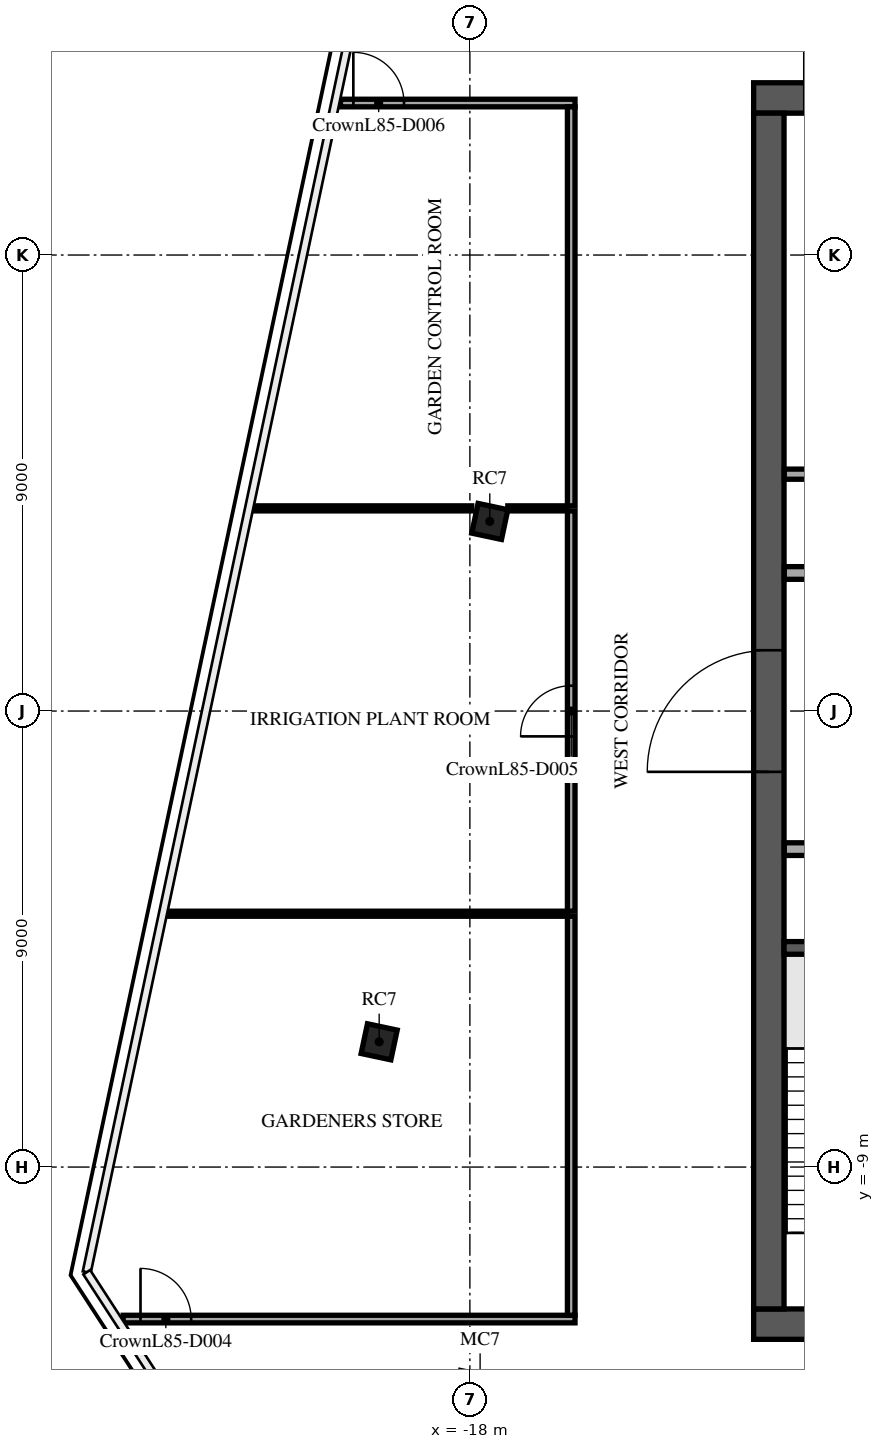
"""IFC4 building model, lengths in metres.
Left out: names, types, materials, properties, quantities, classifications, styles, units other than length and angle.
Written with IfcOpenShell. Run it as: python <this file> out.ifc"""

import sys

from ifc_helpers import new_model, si_unit, direction, frame, frame_2d, origin, origin_2d, place, context, subcontext, project, spatial, rectangle, extrude, element, fill, save


model = new_model("IFC4")
c1 = context("Model", 3, precision=1e-05, world=origin(), true_north=direction((0.0, 1.0)))
c2 = subcontext(c1, "Body", "Model", "MODEL_VIEW")
j1 = project(units=[si_unit("LENGTHUNIT", "METRE"), si_unit("PLANEANGLEUNIT", "RADIAN")], contexts=[c1])
p1 = place(None, origin())
s1 = spatial("IfcSite", under=j1, at=p1, CompositionType="ELEMENT")
p2 = place(p1, origin())
s2 = spatial("IfcBuilding", under=s1, at=p2, CompositionType="ELEMENT")
p3 = place(p2, frame((0.0, 0.0, 363.1)))
s3 = spatial("IfcBuildingStorey", under=s2, at=p3, CompositionType="ELEMENT", Elevation=363.1)
for number, where, z_axis, x_axis in (
    (1, (-17.607, 3.742, 0.0), (0.0, 0.0, 1.0), (0.208, 0.978, 0.0)),
    (2, (-19.79, -6.528, 0.0), (0.0, 0.0, 1.0), (0.208, 0.978, 0.0)),
):
    element("IfcColumn", number, at=place(p3, frame(where, z_axis=z_axis, x_axis=x_axis)), inside=s3, PredefinedType="COLUMN", context=c2, shape_type="SweptSolid", body=[
        extrude(rectangle(XDim=0.6, YDim=0.6, at=origin_2d()), origin(), (0.0, 0.0, 1.0), 5.0),
    ])
p4 = place(p3, frame((-12.4, 12.1, 0.0), z_axis=(0.0, 0.0, 1.0), x_axis=(1.0, 0.0, 0.0)))
e3 = element("IfcWall", 3, at=p4, inside=s3, PredefinedType="SHEAR", context=c2, shape_type="SweptSolid", body=[
    extrude(rectangle(XDim=24.8, YDim=0.6, at=frame_2d((12.4, 0.0))), origin(), (0.0, 0.0, 1.0), 4.7),
])
p5 = place(p4, frame((11.2, 0.0, 0.0)))
e4 = element("IfcOpeningElement", 4, at=p5, cuts=e3, PredefinedType="OPENING", context=c2, shape_type="SweptSolid", body=[
    extrude(rectangle(XDim=2.4, YDim=2.4, at=frame_2d((1.2, 1.2))), frame((0.0, 0.31, 0.0), z_axis=(0.0, -1.0, 0.0), x_axis=(1.0, 0.0, 0.0)), (0.0, 0.0, 1.0), 0.62),
])
p6 = place(p4, frame((22.025, 0.0, 0.0)))
e5 = element("IfcOpeningElement", 5, at=p6, cuts=e3, PredefinedType="OPENING", context=c2, shape_type="SweptSolid", body=[
    extrude(rectangle(XDim=1.2, YDim=2.1, at=frame_2d((0.6, 1.05))), frame((0.0, 0.31, 0.0), z_axis=(0.0, -1.0, 0.0), x_axis=(1.0, 0.0, 0.0)), (0.0, 0.0, 1.0), 0.62),
])
p7 = place(p4, frame((1.0, 0.0, 0.0)))
e6 = element("IfcOpeningElement", 6, at=p7, cuts=e3, PredefinedType="OPENING", context=c2, shape_type="SweptSolid", body=[
    extrude(rectangle(XDim=1.0, YDim=2.1, at=frame_2d((0.5, 1.05))), frame((0.0, 0.31, 0.0), z_axis=(0.0, -1.0, 0.0), x_axis=(1.0, 0.0, 0.0)), (0.0, 0.0, 1.0), 0.62),
])
p8 = place(p3, frame((-12.4, -12.1, 0.0), z_axis=(0.0, 0.0, 1.0), x_axis=(1.0, 0.0, 0.0)))
e7 = element("IfcWall", 7, at=p8, inside=s3, PredefinedType="SHEAR", context=c2, shape_type="SweptSolid", body=[
    extrude(rectangle(XDim=24.8, YDim=0.6, at=frame_2d((12.4, 0.0))), origin(), (0.0, 0.0, 1.0), 4.7),
])
p9 = place(p8, frame((7.3, 0.0, 0.0)))
e8 = element("IfcOpeningElement", 8, at=p9, cuts=e7, PredefinedType="OPENING", context=c2, shape_type="SweptSolid", body=[
    extrude(rectangle(XDim=2.0, YDim=2.1, at=frame_2d((1.0, 1.05))), frame((0.0, 0.31, 0.0), z_axis=(0.0, -1.0, 0.0), x_axis=(1.0, 0.0, 0.0)), (0.0, 0.0, 1.0), 0.62),
])
p10 = place(p8, frame((17.425, 0.0, 0.0)))
e9 = element("IfcOpeningElement", 9, at=p10, cuts=e7, PredefinedType="OPENING", context=c2, shape_type="SweptSolid", body=[
    extrude(rectangle(XDim=1.2, YDim=2.1, at=frame_2d((0.6, 1.05))), frame((0.0, 0.31, 0.0), z_axis=(0.0, -1.0, 0.0), x_axis=(1.0, 0.0, 0.0)), (0.0, 0.0, 1.0), 0.62),
])
p11 = place(p8, frame((1.575, 0.0, 0.0)))
e10 = element("IfcOpeningElement", 10, at=p11, cuts=e7, PredefinedType="OPENING", context=c2, shape_type="SweptSolid", body=[
    extrude(rectangle(XDim=1.2, YDim=2.1, at=frame_2d((0.6, 1.05))), frame((0.0, 0.31, 0.0), z_axis=(0.0, -1.0, 0.0), x_axis=(1.0, 0.0, 0.0)), (0.0, 0.0, 1.0), 0.62),
])
p12 = place(p8, frame((22.025, 0.0, 0.0)))
e11 = element("IfcOpeningElement", 11, at=p12, cuts=e7, PredefinedType="OPENING", context=c2, shape_type="SweptSolid", body=[
    extrude(rectangle(XDim=1.2, YDim=2.1, at=frame_2d((0.6, 1.05))), frame((0.0, 0.31, 0.0), z_axis=(0.0, -1.0, 0.0), x_axis=(1.0, 0.0, 0.0)), (0.0, 0.0, 1.0), 0.62),
])
p13 = place(p3, frame((-12.1, -11.8, 0.0), z_axis=(0.0, 0.0, 1.0), x_axis=(0.0, 1.0, 0.0)))
e12 = element("IfcWall", 12, at=p13, inside=s3, PredefinedType="SHEAR", context=c2, shape_type="SweptSolid", body=[
    extrude(rectangle(XDim=23.6, YDim=0.6, at=frame_2d((11.8, 0.0))), origin(), (0.0, 0.0, 1.0), 4.7),
])
p14 = place(p13, frame((10.6, 0.0, 0.0)))
e13 = element("IfcOpeningElement", 13, at=p14, cuts=e12, PredefinedType="OPENING", context=c2, shape_type="SweptSolid", body=[
    extrude(rectangle(XDim=2.4, YDim=2.4, at=frame_2d((1.2, 1.2))), frame((0.0, 0.31, 0.0), z_axis=(0.0, -1.0, 0.0), x_axis=(1.0, 0.0, 0.0)), (0.0, 0.0, 1.0), 0.62),
])
p15 = place(p3, frame((-8.65, -4.675, 0.0), z_axis=(0.0, 0.0, 1.0), x_axis=(-1.0, 0.0, 0.0)))
e14 = element("IfcWall", 14, at=p15, inside=s3, PredefinedType="SOLIDWALL", context=c2, shape_type="SweptSolid", body=[
    extrude(rectangle(XDim=3.15, YDim=0.25, at=frame_2d((1.575, 0.0))), origin(), (0.0, 0.0, 1.0), 4.7),
])
p16 = place(p3, frame((-11.795, -2.725, 0.0), z_axis=(0.0, 0.0, 1.0), x_axis=(1.0, 0.0, 0.0)))
e15 = element("IfcWall", 15, at=p16, inside=s3, PredefinedType="PARTITIONING", context=c2, shape_type="SweptSolid", body=[
    extrude(rectangle(XDim=14.415, YDim=0.25, at=frame_2d((7.208, 0.0))), origin(), (0.0, 0.0, 1.0), 4.7),
])
p17 = place(p16, frame((1.295, 0.0, 0.0)))
e16 = element("IfcOpeningElement", 16, at=p17, cuts=e15, PredefinedType="OPENING", context=c2, shape_type="SweptSolid", body=[
    extrude(rectangle(XDim=1.0, YDim=2.1, at=frame_2d((0.5, 1.05))), frame((0.0, 0.135, 0.0), z_axis=(0.0, -1.0, 0.0), x_axis=(1.0, 0.0, 0.0)), (0.0, 0.0, 1.0), 0.27),
])
p18 = place(p16, frame((4.42, 0.0, 0.0)))
e17 = element("IfcOpeningElement", 17, at=p18, cuts=e15, PredefinedType="OPENING", context=c2, shape_type="SweptSolid", body=[
    extrude(rectangle(XDim=1.0, YDim=2.1, at=frame_2d((0.5, 1.05))), frame((0.0, 0.135, 0.0), z_axis=(0.0, -1.0, 0.0), x_axis=(1.0, 0.0, 0.0)), (0.0, 0.0, 1.0), 0.27),
])
p19 = place(p16, frame((9.92, 0.0, 0.0)))
e18 = element("IfcOpeningElement", 18, at=p19, cuts=e15, PredefinedType="OPENING", context=c2, shape_type="SweptSolid", body=[
    extrude(rectangle(XDim=1.0, YDim=2.1, at=frame_2d((0.5, 1.05))), frame((0.0, 0.135, 0.0), z_axis=(0.0, -1.0, 0.0), x_axis=(1.0, 0.0, 0.0)), (0.0, 0.0, 1.0), 0.27),
])
p20 = place(p3, frame((-11.795, 2.725, 0.0), z_axis=(0.0, 0.0, 1.0), x_axis=(1.0, 0.0, 0.0)))
e19 = element("IfcWall", 19, at=p20, inside=s3, PredefinedType="PARTITIONING", context=c2, shape_type="SweptSolid", body=[
    extrude(rectangle(XDim=23.59, YDim=0.25, at=frame_2d((11.795, 0.0))), origin(), (0.0, 0.0, 1.0), 4.7),
])
p21 = place(p20, frame((21.345, 0.0, 0.0)))
e20 = element("IfcOpeningElement", 20, at=p21, cuts=e19, PredefinedType="OPENING", context=c2, shape_type="SweptSolid", body=[
    extrude(rectangle(XDim=0.9, YDim=2.1, at=frame_2d((0.45, 1.05))), frame((0.0, 0.135, 0.0), z_axis=(0.0, -1.0, 0.0), x_axis=(1.0, 0.0, 0.0)), (0.0, 0.0, 1.0), 0.27),
])
p22 = place(p20, frame((1.345, 0.0, 0.0)))
e21 = element("IfcOpeningElement", 21, at=p22, cuts=e19, PredefinedType="OPENING", context=c2, shape_type="SweptSolid", body=[
    extrude(rectangle(XDim=0.9, YDim=2.1, at=frame_2d((0.45, 1.05))), frame((0.0, 0.135, 0.0), z_axis=(0.0, -1.0, 0.0), x_axis=(1.0, 0.0, 0.0)), (0.0, 0.0, 1.0), 0.27),
])
p23 = place(p20, frame((4.42, 0.0, 0.0)))
e22 = element("IfcOpeningElement", 22, at=p23, cuts=e19, PredefinedType="OPENING", context=c2, shape_type="SweptSolid", body=[
    extrude(rectangle(XDim=1.0, YDim=2.1, at=frame_2d((0.5, 1.05))), frame((0.0, 0.135, 0.0), z_axis=(0.0, -1.0, 0.0), x_axis=(1.0, 0.0, 0.0)), (0.0, 0.0, 1.0), 0.27),
])
p24 = place(p20, frame((9.82, 0.0, 0.0)))
e23 = element("IfcOpeningElement", 23, at=p24, cuts=e19, PredefinedType="OPENING", context=c2, shape_type="SweptSolid", body=[
    extrude(rectangle(XDim=1.2, YDim=2.1, at=frame_2d((0.6, 1.05))), frame((0.0, 0.135, 0.0), z_axis=(0.0, -1.0, 0.0), x_axis=(1.0, 0.0, 0.0)), (0.0, 0.0, 1.0), 0.27),
])
p25 = place(p3, frame((-11.795, 4.675, 0.0), z_axis=(0.0, 0.0, 1.0), x_axis=(1.0, 0.0, 0.0)))
e24 = element("IfcWall", 24, at=p25, inside=s3, PredefinedType="PARTITIONING", context=c2, shape_type="SweptSolid", body=[
    extrude(rectangle(XDim=3.645, YDim=0.2, at=frame_2d((1.823, 0.0))), origin(), (0.0, 0.0, 1.0), 4.7),
])
p26 = place(p3, frame((-24.842, -12.0, 0.0), z_axis=(0.0, 0.0, 1.0), x_axis=(1.0, 0.0, 0.0)))
e25 = element("IfcWall", 25, at=p26, inside=s3, PredefinedType="PARTITIONING", context=c2, shape_type="SweptSolid", body=[
    extrude(rectangle(XDim=8.917, YDim=0.15, at=frame_2d((4.458, 0.0))), origin(), (0.0, 0.0, 1.0), 4.7),
])
p27 = place(p26, frame((0.342, 0.0, 0.0)))
e26 = element("IfcOpeningElement", 26, at=p27, cuts=e25, PredefinedType="OPENING", context=c2, shape_type="SweptSolid", body=[
    extrude(rectangle(XDim=1.0, YDim=2.1, at=frame_2d((0.5, 1.05))), frame((0.0, 0.085, 0.0), z_axis=(0.0, -1.0, 0.0), x_axis=(1.0, 0.0, 0.0)), (0.0, 0.0, 1.0), 0.17),
])
p28 = place(p3, frame((-23.955, -4.0, 0.0), z_axis=(0.0, 0.0, 1.0), x_axis=(1.0, 0.0, 0.0)))
e27 = element("IfcWall", 27, at=p28, inside=s3, PredefinedType="PARTITIONING", context=c2, shape_type="SweptSolid", body=[
    extrude(rectangle(XDim=7.88, YDim=0.1, at=frame_2d((3.94, 0.0))), origin(), (0.0, 0.0, 1.0), 4.7),
])
p29 = place(p3, frame((-22.255, 4.0, 0.0), z_axis=(0.0, 0.0, 1.0), x_axis=(1.0, 0.0, 0.0)))
e28 = element("IfcWall", 28, at=p29, inside=s3, PredefinedType="PARTITIONING", context=c2, shape_type="SweptSolid", body=[
    extrude(rectangle(XDim=4.292, YDim=0.1, at=frame_2d((2.146, 0.0))), origin(), (0.0, 0.0, 1.0), 4.29),
])
p30 = place(p3, frame((-17.251, 4.0, 0.0), z_axis=(0.0, 0.0, 1.0), x_axis=(1.0, 0.0, 0.0)))
e29 = element("IfcWall", 29, at=p30, inside=s3, PredefinedType="PARTITIONING", context=c2, shape_type="SweptSolid", body=[
    extrude(rectangle(XDim=1.176, YDim=0.1, at=frame_2d((0.588, 0.0))), origin(), (0.0, 0.0, 1.0), 4.7),
])
p31 = place(p3, frame((-20.554, 12.0, 0.0), z_axis=(0.0, 0.0, 1.0), x_axis=(1.0, 0.0, 0.0)))
e30 = element("IfcWall", 30, at=p31, inside=s3, PredefinedType="PARTITIONING", context=c2, shape_type="SweptSolid", body=[
    extrude(rectangle(XDim=4.629, YDim=0.15, at=frame_2d((2.314, 0.0))), origin(), (0.0, 0.0, 1.0), 4.7),
])
p32 = place(p31, frame((0.254, 0.0, 0.0)))
e31 = element("IfcOpeningElement", 31, at=p32, cuts=e30, PredefinedType="OPENING", context=c2, shape_type="SweptSolid", body=[
    extrude(rectangle(XDim=1.0, YDim=2.1, at=frame_2d((0.5, 1.05))), frame((0.0, 0.085, 0.0), z_axis=(0.0, -1.0, 0.0), x_axis=(1.0, 0.0, 0.0)), (0.0, 0.0, 1.0), 0.17),
])
p33 = place(p3, frame((-16.0, -11.925, 0.0), z_axis=(0.0, 0.0, 1.0), x_axis=(0.0, 1.0, 0.0)))
e32 = element("IfcWall", 32, at=p33, inside=s3, PredefinedType="PARTITIONING", context=c2, shape_type="SweptSolid", body=[
    extrude(rectangle(XDim=7.875, YDim=0.15, at=frame_2d((3.938, 0.0))), origin(), (0.0, 0.0, 1.0), 4.7),
])
p34 = place(p3, frame((-16.0, -3.95, 0.0), z_axis=(0.0, 0.0, 1.0), x_axis=(0.0, 1.0, 0.0)))
e33 = element("IfcWall", 33, at=p34, inside=s3, PredefinedType="PARTITIONING", context=c2, shape_type="SweptSolid", body=[
    extrude(rectangle(XDim=7.9, YDim=0.15, at=frame_2d((3.95, 0.0))), origin(), (0.0, 0.0, 1.0), 4.7),
])
p35 = place(p34, frame((3.45, 0.0, 0.0)))
e34 = element("IfcOpeningElement", 34, at=p35, cuts=e33, PredefinedType="OPENING", context=c2, shape_type="SweptSolid", body=[
    extrude(rectangle(XDim=1.0, YDim=2.1, at=frame_2d((0.5, 1.05))), frame((0.0, 0.085, 0.0), z_axis=(0.0, -1.0, 0.0), x_axis=(1.0, 0.0, 0.0)), (0.0, 0.0, 1.0), 0.17),
])
p36 = place(p3, frame((-16.0, 4.05, 0.0), z_axis=(0.0, 0.0, 1.0), x_axis=(0.0, 1.0, 0.0)))
e35 = element("IfcWall", 35, at=p36, inside=s3, PredefinedType="PARTITIONING", context=c2, shape_type="SweptSolid", body=[
    extrude(rectangle(XDim=7.875, YDim=0.15, at=frame_2d((3.938, 0.0))), origin(), (0.0, 0.0, 1.0), 4.23),
])
p37 = place(p14, origin())
e36 = element("IfcDoor", 36, at=p37, inside=s3, OperationType="SINGLE_SWING_LEFT", PredefinedType="DOOR", context=c2, shape_type="SweptSolid", body=[
    extrude(rectangle(XDim=2.4, YDim=2.4, at=frame_2d((1.2, 1.2))), frame((0.0, 0.025, 0.0), z_axis=(0.0, -1.0, 0.0), x_axis=(1.0, 0.0, 0.0)), (0.0, 0.0, 1.0), 0.05),
])
fill(e13, e36)
p38 = place(p27, origin())
e37 = element("IfcDoor", 37, at=p38, inside=s3, OperationType="SINGLE_SWING_RIGHT", PredefinedType="DOOR", context=c2, shape_type="SweptSolid", body=[
    extrude(rectangle(XDim=1.0, YDim=2.1, at=frame_2d((0.5, 1.05))), frame((0.0, 0.025, 0.0), z_axis=(0.0, -1.0, 0.0), x_axis=(1.0, 0.0, 0.0)), (0.0, 0.0, 1.0), 0.05),
])
fill(e26, e37)
p39 = place(p35, origin())
e38 = element("IfcDoor", 38, at=p39, inside=s3, OperationType="SINGLE_SWING_LEFT", PredefinedType="DOOR", context=c2, shape_type="SweptSolid", body=[
    extrude(rectangle(XDim=1.0, YDim=2.1, at=frame_2d((0.5, 1.05))), frame((0.0, 0.025, 0.0), z_axis=(0.0, -1.0, 0.0), x_axis=(1.0, 0.0, 0.0)), (0.0, 0.0, 1.0), 0.05),
])
fill(e34, e38)
p40 = place(p32, origin())
e39 = element("IfcDoor", 39, at=p40, inside=s3, OperationType="SINGLE_SWING_RIGHT", PredefinedType="DOOR", context=c2, shape_type="SweptSolid", body=[
    extrude(rectangle(XDim=1.0, YDim=2.1, at=frame_2d((0.5, 1.05))), frame((0.0, 0.025, 0.0), z_axis=(0.0, -1.0, 0.0), x_axis=(1.0, 0.0, 0.0)), (0.0, 0.0, 1.0), 0.05),
])
fill(e31, e39)
save(model, sys.argv[1])
